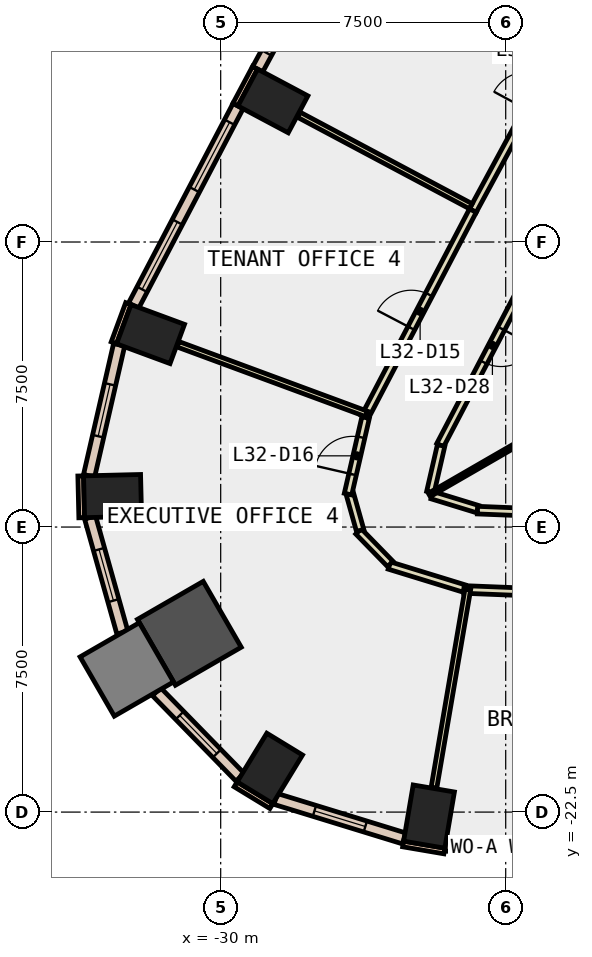
"""IFC4 building model, lengths in metres.
Left out: names, types, materials, properties, quantities, classifications, styles, units other than length and angle.
Written with IfcOpenShell. Run it as: python <this file> out.ifc"""

import sys

from ifc_helpers import new_model, si_unit, direction, frame, frame_2d, origin, origin_2d, place, context, subcontext, project, spatial, rectangle, extrude, element, fill, save


model = new_model("IFC4")
c1 = context("Model", 3, precision=1e-05, world=origin(), true_north=direction((0.0, 1.0)))
c2 = subcontext(c1, "Body", "Model", "MODEL_VIEW")
j1 = project(units=[si_unit("LENGTHUNIT", "METRE"), si_unit("PLANEANGLEUNIT", "RADIAN")], contexts=[c1])
p1 = place(None, origin())
s1 = spatial("IfcSite", under=j1, at=p1, CompositionType="ELEMENT")
p2 = place(p1, origin())
s2 = spatial("IfcBuilding", under=s1, at=p2, CompositionType="ELEMENT")
p3 = place(p2, frame((0.0, 0.0, 146.6)))
s3 = spatial("IfcBuildingStorey", under=s2, at=p3, CompositionType="ELEMENT", Elevation=146.6)
for number, where, z_axis, x_axis in (
    (1, (-24.518, -22.618, -0.4), (0.0, 0.0, 1.0), (-0.986, 0.168, 0.0)),
    (2, (-28.626, -3.788, -0.4), (0.0, 0.0, 1.0), (0.47, 0.883, 0.0)),
    (3, (-31.846, -9.923, -0.4), (0.0, 0.0, 1.0), (0.347, 0.938, 0.0)),
    (4, (-32.845, -14.185, -0.4), (0.0, 0.0, 1.0), (-0.024, 1.0, 0.0)),
):
    element("IfcColumn", number, at=place(p3, frame(where, z_axis=z_axis, x_axis=x_axis)), inside=s3, PredefinedType="COLUMN", context=c2, shape_type="SweptSolid", body=[
        extrude(rectangle(XDim=1.1, YDim=1.5, at=origin_2d()), origin(), (0.0, 0.0, 1.0), 4.2),
    ])
p4 = place(p3, frame((-30.825, -17.796, -0.4), z_axis=(0.0, 0.0, 1.0), x_axis=(0.866025403784, 0.5, 0.0)))
e5 = element("IfcColumn", 5, at=p4, inside=s3, PredefinedType="COLUMN", context=c2, shape_type="SweptSolid", body=[
    extrude(rectangle(XDim=2.0, YDim=2.0, at=origin_2d()), origin(), (0.0, 0.0, 1.0), 4.2),
])
p5 = place(p3, frame((-28.707, -21.352, -0.4), z_axis=(0.0, 0.0, 1.0), x_axis=(-0.853714435155, 0.520741455243, 0.0)))
e6 = element("IfcColumn", 6, at=p5, inside=s3, PredefinedType="COLUMN", context=c2, shape_type="SweptSolid", body=[
    extrude(rectangle(XDim=1.1, YDim=1.5, at=origin_2d()), origin(), (0.0, 0.0, 1.0), 4.2),
])
p6 = place(p3, frame((-32.47, -18.746, -0.4), z_axis=(0.0, 0.0, 1.0), x_axis=(0.866025403784, 0.5, 0.0)))
e7 = element("IfcColumn", 7, at=p6, inside=s3, PredefinedType="COLUMN", context=c2, shape_type="SweptSolid", body=[
    extrude(rectangle(XDim=1.8, YDim=1.8, at=origin_2d()), origin(), (0.0, 0.0, 1.0), 4.2),
])
for number, where, z_axis, x_axis in (
    (8, (-29.095, -2.915, 0.0), (0.0, 0.0, 1.0), (-0.47, -0.883, 0.0)),
    (9, (-32.429, -9.121, 0.0), (0.0, 0.0, 1.0), (-0.346, -0.938, 0.0)),
):
    element("IfcWall", number, at=place(p3, frame(where, z_axis=z_axis, x_axis=x_axis)), inside=s3, PredefinedType="STANDARD", context=c2, shape_type="SweptSolid", body=[
        extrude(rectangle(XDim=1.1, YDim=0.15, at=frame_2d((0.55, 0.0))), origin(), (0.0, 0.0, 1.0), 3.8),
    ])
p7 = place(p3, frame((-25.199, -23.339, 0.0), z_axis=(0.0, 0.0, 1.0), x_axis=(0.985800082077, -0.167923191299, 0.0)))
e10 = element("IfcWall", 10, at=p7, inside=s3, PredefinedType="STANDARD", context=c2, shape_type="SweptSolid", body=[
    extrude(rectangle(XDim=1.101, YDim=0.15, at=frame_2d((0.55, 0.0))), origin(), (0.0, 0.0, 1.0), 3.8),
])
p8 = place(p3, frame((-33.683, -13.655, 0.0), z_axis=(0.0, 0.0, 1.0), x_axis=(0.023744690764, -0.999718055084, 0.0)))
e11 = element("IfcWall", 11, at=p8, inside=s3, PredefinedType="STANDARD", context=c2, shape_type="SweptSolid", body=[
    extrude(rectangle(XDim=1.1, YDim=0.15, at=frame_2d((0.55, 0.0))), origin(), (0.0, 0.0, 1.0), 3.8),
])
p9 = place(p3, frame((-29.606, -21.77, 0.0), z_axis=(0.0, 0.0, 1.0), x_axis=(0.854005542721, -0.520263907071, 0.0)))
e12 = element("IfcWall", 12, at=p9, inside=s3, PredefinedType="STANDARD", context=c2, shape_type="SweptSolid", body=[
    extrude(rectangle(XDim=1.099, YDim=0.15, at=frame_2d((0.55, 0.0))), origin(), (0.0, 0.0, 1.0), 3.8),
])
p10 = place(p3, frame((-24.09, -23.378, 0.0), z_axis=(0.0, 0.0, 1.0), x_axis=(0.999203621229, -0.039901420066, 0.0)))
e13 = element("IfcWall", 13, at=p10, inside=s3, PredefinedType="STANDARD", context=c2, shape_type="SweptSolid", body=[
    extrude(rectangle(XDim=7.318, YDim=0.3, at=frame_2d((3.659, 0.0))), origin(), (0.0, 0.0, 1.0), 3.8),
])
p11 = place(p10, frame((0.629, 0.0, 0.9)))
e14 = element("IfcOpeningElement", 14, at=p11, cuts=e13, PredefinedType="OPENING", context=c2, shape_type="SweptSolid", body=[
    extrude(rectangle(XDim=2.4, YDim=2.6, at=frame_2d((1.2, 1.3))), frame((0.0, 0.16, 0.0), z_axis=(0.0, -1.0, 0.0), x_axis=(1.0, 0.0, 0.0)), (0.0, 0.0, 1.0), 0.32),
])
p12 = place(p10, frame((4.288, 0.0, 0.9)))
e15 = element("IfcOpeningElement", 15, at=p12, cuts=e13, PredefinedType="OPENING", context=c2, shape_type="SweptSolid", body=[
    extrude(rectangle(XDim=2.4, YDim=2.6, at=frame_2d((1.2, 1.3))), frame((0.0, 0.16, 0.0), z_axis=(0.0, -1.0, 0.0), x_axis=(1.0, 0.0, 0.0)), (0.0, 0.0, 1.0), 0.32),
])
p13 = place(p3, frame((-26.194, 2.282, 0.0), z_axis=(0.0, 0.0, 1.0), x_axis=(-0.475794135288, -0.87955667289, 0.0)))
e16 = element("IfcWall", 16, at=p13, inside=s3, PredefinedType="STANDARD", context=c2, shape_type="SweptSolid", body=[
    extrude(rectangle(XDim=5.952, YDim=0.3, at=frame_2d((2.976, 0.0))), origin(), (0.0, 0.0, 1.0), 3.8),
])
p14 = place(p13, frame((0.488, 0.0, 0.9)))
e17 = element("IfcOpeningElement", 17, at=p14, cuts=e16, PredefinedType="OPENING", context=c2, shape_type="SweptSolid", body=[
    extrude(rectangle(XDim=2.0, YDim=2.6, at=frame_2d((1.0, 1.3))), frame((0.0, 0.16, 0.0), z_axis=(0.0, -1.0, 0.0), x_axis=(1.0, 0.0, 0.0)), (0.0, 0.0, 1.0), 0.32),
])
p15 = place(p13, frame((3.464, 0.0, 0.9)))
e18 = element("IfcOpeningElement", 18, at=p15, cuts=e16, PredefinedType="OPENING", context=c2, shape_type="SweptSolid", body=[
    extrude(rectangle(XDim=2.0, YDim=2.6, at=frame_2d((1.0, 1.3))), frame((0.0, 0.16, 0.0), z_axis=(0.0, -1.0, 0.0), x_axis=(1.0, 0.0, 0.0)), (0.0, 0.0, 1.0), 0.32),
])
p16 = place(p3, frame((-29.542, -3.922, 0.0), z_axis=(0.0, 0.0, 1.0), x_axis=(-0.463809970306, -0.885934710599, 0.0)))
e19 = element("IfcWall", 19, at=p16, inside=s3, PredefinedType="STANDARD", context=c2, shape_type="SweptSolid", body=[
    extrude(rectangle(XDim=5.927, YDim=0.3, at=frame_2d((2.963, 0.0))), origin(), (0.0, 0.0, 1.0), 3.8),
])
p17 = place(p16, frame((0.482, 0.0, 0.9)))
e20 = element("IfcOpeningElement", 20, at=p17, cuts=e19, PredefinedType="OPENING", context=c2, shape_type="SweptSolid", body=[
    extrude(rectangle(XDim=2.0, YDim=2.6, at=frame_2d((1.0, 1.3))), frame((0.0, 0.16, 0.0), z_axis=(0.0, -1.0, 0.0), x_axis=(1.0, 0.0, 0.0)), (0.0, 0.0, 1.0), 0.32),
])
p18 = place(p16, frame((3.445, 0.0, 0.9)))
e21 = element("IfcOpeningElement", 21, at=p18, cuts=e19, PredefinedType="OPENING", context=c2, shape_type="SweptSolid", body=[
    extrude(rectangle(XDim=2.0, YDim=2.6, at=frame_2d((1.0, 1.3))), frame((0.0, 0.16, 0.0), z_axis=(0.0, -1.0, 0.0), x_axis=(1.0, 0.0, 0.0)), (0.0, 0.0, 1.0), 0.32),
])
p19 = place(p3, frame((-32.672, -10.203, 0.0), z_axis=(0.0, 0.0, 1.0), x_axis=(-0.223538714932, -0.974695051247, 0.0)))
e22 = element("IfcWall", 22, at=p19, inside=s3, PredefinedType="STANDARD", context=c2, shape_type="SweptSolid", body=[
    extrude(rectangle(XDim=3.538, YDim=0.3, at=frame_2d((1.769, 0.0))), origin(), (0.0, 0.0, 1.0), 3.8),
])
p20 = place(p19, frame((1.069, 0.0, 0.9)))
e23 = element("IfcOpeningElement", 23, at=p20, cuts=e22, PredefinedType="OPENING", context=c2, shape_type="SweptSolid", body=[
    extrude(rectangle(XDim=1.4, YDim=2.6, at=frame_2d((0.7, 1.3))), frame((0.0, 0.16, 0.0), z_axis=(0.0, -1.0, 0.0), x_axis=(1.0, 0.0, 0.0)), (0.0, 0.0, 1.0), 0.32),
])
p21 = place(p3, frame((-33.437, -14.749, 0.0), z_axis=(0.0, 0.0, 1.0), x_axis=(0.270471130801, -0.962728085912, 0.0)))
e24 = element("IfcWall", 24, at=p21, inside=s3, PredefinedType="STANDARD", context=c2, shape_type="SweptSolid", body=[
    extrude(rectangle(XDim=3.143, YDim=0.3, at=frame_2d((1.572, 0.0))), origin(), (0.0, 0.0, 1.0), 3.8),
])
p22 = place(p21, frame((0.872, 0.0, 0.9)))
e25 = element("IfcOpeningElement", 25, at=p22, cuts=e24, PredefinedType="OPENING", context=c2, shape_type="SweptSolid", body=[
    extrude(rectangle(XDim=1.4, YDim=2.6, at=frame_2d((0.7, 1.3))), frame((0.0, 0.16, 0.0), z_axis=(0.0, -1.0, 0.0), x_axis=(1.0, 0.0, 0.0)), (0.0, 0.0, 1.0), 0.32),
])
p23 = place(p3, frame((-31.688, -19.332, 0.0), z_axis=(0.0, 0.0, 1.0), x_axis=(0.698633260198, -0.715479956215, 0.0)))
e26 = element("IfcWall", 26, at=p23, inside=s3, PredefinedType="STANDARD", context=c2, shape_type="SweptSolid", body=[
    extrude(rectangle(XDim=3.145, YDim=0.3, at=frame_2d((1.572, 0.0))), origin(), (0.0, 0.0, 1.0), 3.8),
])
p24 = place(p23, frame((0.872, 0.0, 0.9)))
e27 = element("IfcOpeningElement", 27, at=p24, cuts=e26, PredefinedType="OPENING", context=c2, shape_type="SweptSolid", body=[
    extrude(rectangle(XDim=1.4, YDim=2.6, at=frame_2d((0.7, 1.3))), frame((0.0, 0.16, 0.0), z_axis=(0.0, -1.0, 0.0), x_axis=(1.0, 0.0, 0.0)), (0.0, 0.0, 1.0), 0.32),
])
p25 = place(p3, frame((-28.554, -22.154, 0.0), z_axis=(0.0, 0.0, 1.0), x_axis=(0.955874475611, -0.293775402094, 0.0)))
e28 = element("IfcWall", 28, at=p25, inside=s3, PredefinedType="STANDARD", context=c2, shape_type="SweptSolid", body=[
    extrude(rectangle(XDim=3.537, YDim=0.3, at=frame_2d((1.769, 0.0))), origin(), (0.0, 0.0, 1.0), 3.8),
])
p26 = place(p25, frame((1.069, 0.0, 0.9)))
e29 = element("IfcOpeningElement", 29, at=p26, cuts=e28, PredefinedType="OPENING", context=c2, shape_type="SweptSolid", body=[
    extrude(rectangle(XDim=1.4, YDim=2.6, at=frame_2d((0.7, 1.3))), frame((0.0, 0.16, 0.0), z_axis=(0.0, -1.0, 0.0), x_axis=(1.0, 0.0, 0.0)), (0.0, 0.0, 1.0), 0.32),
])
p27 = place(p3, frame((-21.475, -7.594, 0.0), z_axis=(0.0, 0.0, 1.0), x_axis=(-0.463809970306, -0.885934710599, 0.0)))
e30 = element("IfcWall", 30, at=p27, inside=s3, PredefinedType="PARTITIONING", context=c2, shape_type="SweptSolid", body=[
    extrude(rectangle(XDim=5.927, YDim=0.2, at=frame_2d((2.963, 0.0))), origin(), (0.0, 0.0, 1.0), 3.8),
])
p28 = place(p27, frame((2.464, 0.0, 0.0)))
e31 = element("IfcOpeningElement", 31, at=p28, cuts=e30, PredefinedType="OPENING", context=c2, shape_type="SweptSolid", body=[
    extrude(rectangle(XDim=1.0, YDim=2.1, at=frame_2d((0.5, 1.05))), frame((0.0, 0.11, 0.0), z_axis=(0.0, -1.0, 0.0), x_axis=(1.0, 0.0, 0.0)), (0.0, 0.0, 1.0), 0.22),
])
p29 = place(p3, frame((-24.2, -12.854, 0.0), z_axis=(0.0, 0.0, 1.0), x_axis=(-0.223967203961, -0.974596681479, 0.0)))
e32 = element("IfcWall", 32, at=p29, inside=s3, PredefinedType="PARTITIONING", context=c2, shape_type="SweptSolid", body=[
    extrude(rectangle(XDim=1.259, YDim=0.2, at=frame_2d((0.629, 0.0))), origin(), (0.0, 0.0, 1.0), 3.8),
])
p30 = place(p3, frame((-24.435, -14.162, 0.0), z_axis=(0.0, 0.0, 1.0), x_axis=(0.956086269468, -0.293085389152, 0.0)))
e33 = element("IfcWall", 33, at=p30, inside=s3, PredefinedType="PARTITIONING", context=c2, shape_type="SweptSolid", body=[
    extrude(rectangle(XDim=1.252, YDim=0.2, at=frame_2d((0.626, 0.0))), origin(), (0.0, 0.0, 1.0), 3.8),
])
p31 = place(p3, frame((-23.242, -14.555, 0.0), z_axis=(0.0, 0.0, 1.0), x_axis=(0.999202143743, -0.039938401802, 0.0)))
e34 = element("IfcWall", 34, at=p31, inside=s3, PredefinedType="PARTITIONING", context=c2, shape_type="SweptSolid", body=[
    extrude(rectangle(XDim=7.238, YDim=0.2, at=frame_2d((3.619, 0.0))), origin(), (0.0, 0.0, 1.0), 3.8),
])
p32 = place(p31, frame((3.119, 0.0, 0.0)))
e35 = element("IfcOpeningElement", 35, at=p32, cuts=e34, PredefinedType="OPENING", context=c2, shape_type="SweptSolid", body=[
    extrude(rectangle(XDim=1.0, YDim=2.1, at=frame_2d((0.5, 1.05))), frame((0.0, 0.11, 0.0), z_axis=(0.0, -1.0, 0.0), x_axis=(1.0, 0.0, 0.0)), (0.0, 0.0, 1.0), 0.22),
])
p33 = place(p3, frame((-23.365, -6.673, 0.0), z_axis=(0.0, 0.0, 1.0), x_axis=(0.47597665142, 0.879457916732, 0.0)))
e36 = element("IfcWall", 36, at=p33, inside=s3, PredefinedType="PARTITIONING", context=c2, shape_type="SweptSolid", body=[
    extrude(rectangle(XDim=7.032, YDim=0.2, at=frame_2d((3.516, 0.0))), origin(), (0.0, 0.0, 1.0), 3.8),
])
p34 = place(p33, frame((3.016, 0.0, 0.0)))
e37 = element("IfcOpeningElement", 37, at=p34, cuts=e36, PredefinedType="OPENING", context=c2, shape_type="SweptSolid", body=[
    extrude(rectangle(XDim=1.0, YDim=2.1, at=frame_2d((0.5, 1.05))), frame((0.0, 0.11, 0.0), z_axis=(0.0, -1.0, 0.0), x_axis=(1.0, 0.0, 0.0)), (0.0, 0.0, 1.0), 0.22),
])
p35 = place(p3, frame((-26.21, -12.111, 0.0), z_axis=(0.0, 0.0, 1.0), x_axis=(0.46374980173, 0.885966207818, 0.0)))
e38 = element("IfcWall", 38, at=p35, inside=s3, PredefinedType="PARTITIONING", context=c2, shape_type="SweptSolid", body=[
    extrude(rectangle(XDim=6.137, YDim=0.2, at=frame_2d((3.068, 0.0))), origin(), (0.0, 0.0, 1.0), 3.8),
])
p36 = place(p35, frame((2.644, 0.0, 0.0)))
e39 = element("IfcOpeningElement", 39, at=p36, cuts=e38, PredefinedType="OPENING", context=c2, shape_type="SweptSolid", body=[
    extrude(rectangle(XDim=1.0, YDim=2.1, at=frame_2d((0.5, 1.05))), frame((0.0, 0.11, 0.0), z_axis=(0.0, -1.0, 0.0), x_axis=(1.0, 0.0, 0.0)), (0.0, 0.0, 1.0), 0.22),
])
p37 = place(p3, frame((-23.594, -16.617, 0.0), z_axis=(0.0, 0.0, 1.0), x_axis=(-0.955896815358, 0.293702704087, 0.0)))
e40 = element("IfcWall", 40, at=p37, inside=s3, PredefinedType="PARTITIONING", context=c2, shape_type="SweptSolid", body=[
    extrude(rectangle(XDim=2.06, YDim=0.2, at=frame_2d((1.03, 0.0))), origin(), (0.0, 0.0, 1.0), 3.8),
])
p38 = place(p3, frame((-25.538, -15.97, 0.0), z_axis=(0.0, 0.0, 1.0), x_axis=(-0.698272822523, 0.715831729756, 0.0)))
e41 = element("IfcWall", 41, at=p38, inside=s3, PredefinedType="PARTITIONING", context=c2, shape_type="SweptSolid", body=[
    extrude(rectangle(XDim=1.196, YDim=0.2, at=frame_2d((0.598, 0.0))), origin(), (0.0, 0.0, 1.0), 3.8),
])
p39 = place(p3, frame((-26.33, -15.089, 0.0), z_axis=(0.0, 0.0, 1.0), x_axis=(-0.270631784819, 0.962682936925, 0.0)))
e42 = element("IfcWall", 42, at=p39, inside=s3, PredefinedType="PARTITIONING", context=c2, shape_type="SweptSolid", body=[
    extrude(rectangle(XDim=0.994, YDim=0.2, at=frame_2d((0.497, 0.0))), origin(), (0.0, 0.0, 1.0), 3.8),
])
p40 = place(p3, frame((-26.649, -14.133, 0.0), z_axis=(0.0, 0.0, 1.0), x_axis=(0.224108401048, 0.974564222912, 0.0)))
e43 = element("IfcWall", 43, at=p40, inside=s3, PredefinedType="PARTITIONING", context=c2, shape_type="SweptSolid", body=[
    extrude(rectangle(XDim=2.065, YDim=0.2, at=frame_2d((1.033, 0.0))), origin(), (0.0, 0.0, 1.0), 3.8),
])
p41 = place(p40, frame((0.533, 0.0, 0.0)))
e44 = element("IfcOpeningElement", 44, at=p41, cuts=e43, PredefinedType="OPENING", context=c2, shape_type="SweptSolid", body=[
    extrude(rectangle(XDim=1.0, YDim=2.1, at=frame_2d((0.5, 1.05))), frame((0.0, 0.11, 0.0), z_axis=(0.0, -1.0, 0.0), x_axis=(1.0, 0.0, 0.0)), (0.0, 0.0, 1.0), 0.22),
])
p42 = place(p3, frame((-15.94, -16.948, 0.0), z_axis=(0.0, 0.0, 1.0), x_axis=(-0.999203094545, 0.03991460699, 0.0)))
e45 = element("IfcWall", 45, at=p42, inside=s3, PredefinedType="PARTITIONING", context=c2, shape_type="SweptSolid", body=[
    extrude(rectangle(XDim=7.664, YDim=0.2, at=frame_2d((3.832, 0.0))), origin(), (0.0, 0.0, 1.0), 3.8),
])
p43 = place(p42, frame((3.332, 0.0, 0.0)))
e46 = element("IfcOpeningElement", 46, at=p43, cuts=e45, PredefinedType="OPENING", context=c2, shape_type="SweptSolid", body=[
    extrude(rectangle(XDim=1.0, YDim=2.1, at=frame_2d((0.5, 1.05))), frame((0.0, 0.11, 0.0), z_axis=(0.0, -1.0, 0.0), x_axis=(1.0, 0.0, 0.0)), (0.0, 0.0, 1.0), 0.22),
])
p44 = place(p3, frame((-18.553, -10.715, 0.0), z_axis=(0.0, 0.0, 1.0), x_axis=(-0.865984622623, -0.500070628392, 0.0)))
e47 = element("IfcWall", 47, at=p44, inside=s3, PredefinedType="PARTITIONING", context=c2, shape_type="SweptSolid", body=[
    extrude(rectangle(XDim=6.879, YDim=0.1, at=frame_2d((3.439, 0.0))), origin(), (0.0, 0.0, 1.0), 3.8),
])
p45 = place(p3, frame((-23.417, -6.56, 0.0), z_axis=(0.0, 0.0, 1.0), x_axis=(-0.882784638588, 0.469777906967, 0.0)))
e48 = element("IfcWall", 48, at=p45, inside=s3, PredefinedType="PARTITIONING", context=c2, shape_type="SweptSolid", body=[
    extrude(rectangle(XDim=5.13, YDim=0.15, at=frame_2d((2.565, 0.0))), origin(), (0.0, 0.0, 1.0), 3.8),
])
p46 = place(p3, frame((-26.164, -12.023, 0.0), z_axis=(0.0, 0.0, 1.0), x_axis=(-0.937995804261, 0.346646608505, 0.0)))
e49 = element("IfcWall", 49, at=p46, inside=s3, PredefinedType="PARTITIONING", context=c2, shape_type="SweptSolid", body=[
    extrude(rectangle(XDim=5.288, YDim=0.15, at=frame_2d((2.644, 0.0))), origin(), (0.0, 0.0, 1.0), 3.8),
])
p47 = place(p3, frame((-23.498, -16.646, 0.0), z_axis=(0.0, 0.0, 1.0), x_axis=(-0.168275674737, -0.985739974482, 0.0)))
e50 = element("IfcWall", 50, at=p47, inside=s3, PredefinedType="PARTITIONING", context=c2, shape_type="SweptSolid", body=[
    extrude(rectangle(XDim=5.288, YDim=0.15, at=frame_2d((2.644, 0.0))), origin(), (0.0, 0.0, 1.0), 3.8),
])
p48 = place(p11, origin())
e51 = element("IfcWindow", 51, at=p48, inside=s3, PartitioningType="SINGLE_PANEL", PredefinedType="WINDOW", context=c2, shape_type="SweptSolid", body=[
    extrude(rectangle(XDim=2.4, YDim=2.6, at=frame_2d((1.2, 1.3))), frame((0.0, 0.03, 0.0), z_axis=(0.0, -1.0, 0.0), x_axis=(1.0, 0.0, 0.0)), (0.0, 0.0, 1.0), 0.06),
])
fill(e14, e51)
p49 = place(p15, origin())
e52 = element("IfcWindow", 52, at=p49, inside=s3, PartitioningType="SINGLE_PANEL", PredefinedType="WINDOW", context=c2, shape_type="SweptSolid", body=[
    extrude(rectangle(XDim=2.0, YDim=2.6, at=frame_2d((1.0, 1.3))), frame((0.0, 0.03, 0.0), z_axis=(0.0, -1.0, 0.0), x_axis=(1.0, 0.0, 0.0)), (0.0, 0.0, 1.0), 0.06),
])
fill(e18, e52)
p50 = place(p17, origin())
e53 = element("IfcWindow", 53, at=p50, inside=s3, PartitioningType="SINGLE_PANEL", PredefinedType="WINDOW", context=c2, shape_type="SweptSolid", body=[
    extrude(rectangle(XDim=2.0, YDim=2.6, at=frame_2d((1.0, 1.3))), frame((0.0, 0.03, 0.0), z_axis=(0.0, -1.0, 0.0), x_axis=(1.0, 0.0, 0.0)), (0.0, 0.0, 1.0), 0.06),
])
fill(e20, e53)
p51 = place(p18, origin())
e54 = element("IfcWindow", 54, at=p51, inside=s3, PartitioningType="SINGLE_PANEL", PredefinedType="WINDOW", context=c2, shape_type="SweptSolid", body=[
    extrude(rectangle(XDim=2.0, YDim=2.6, at=frame_2d((1.0, 1.3))), frame((0.0, 0.03, 0.0), z_axis=(0.0, -1.0, 0.0), x_axis=(1.0, 0.0, 0.0)), (0.0, 0.0, 1.0), 0.06),
])
fill(e21, e54)
p52 = place(p20, origin())
e55 = element("IfcWindow", 55, at=p52, inside=s3, PartitioningType="SINGLE_PANEL", PredefinedType="WINDOW", context=c2, shape_type="SweptSolid", body=[
    extrude(rectangle(XDim=1.4, YDim=2.6, at=frame_2d((0.7, 1.3))), frame((0.0, 0.03, 0.0), z_axis=(0.0, -1.0, 0.0), x_axis=(1.0, 0.0, 0.0)), (0.0, 0.0, 1.0), 0.06),
])
fill(e23, e55)
p53 = place(p22, origin())
e56 = element("IfcWindow", 56, at=p53, inside=s3, PartitioningType="SINGLE_PANEL", PredefinedType="WINDOW", context=c2, shape_type="SweptSolid", body=[
    extrude(rectangle(XDim=1.4, YDim=2.6, at=frame_2d((0.7, 1.3))), frame((0.0, 0.03, 0.0), z_axis=(0.0, -1.0, 0.0), x_axis=(1.0, 0.0, 0.0)), (0.0, 0.0, 1.0), 0.06),
])
fill(e25, e56)
p54 = place(p24, origin())
e57 = element("IfcWindow", 57, at=p54, inside=s3, PartitioningType="SINGLE_PANEL", PredefinedType="WINDOW", context=c2, shape_type="SweptSolid", body=[
    extrude(rectangle(XDim=1.4, YDim=2.6, at=frame_2d((0.7, 1.3))), frame((0.0, 0.03, 0.0), z_axis=(0.0, -1.0, 0.0), x_axis=(1.0, 0.0, 0.0)), (0.0, 0.0, 1.0), 0.06),
])
fill(e27, e57)
p55 = place(p26, origin())
e58 = element("IfcWindow", 58, at=p55, inside=s3, PartitioningType="SINGLE_PANEL", PredefinedType="WINDOW", context=c2, shape_type="SweptSolid", body=[
    extrude(rectangle(XDim=1.4, YDim=2.6, at=frame_2d((0.7, 1.3))), frame((0.0, 0.03, 0.0), z_axis=(0.0, -1.0, 0.0), x_axis=(1.0, 0.0, 0.0)), (0.0, 0.0, 1.0), 0.06),
])
fill(e29, e58)
p56 = place(p36, origin())
e59 = element("IfcDoor", 59, at=p56, inside=s3, OperationType="SINGLE_SWING_LEFT", PredefinedType="DOOR", context=c2, shape_type="SweptSolid", body=[
    extrude(rectangle(XDim=1.0, YDim=2.1, at=frame_2d((0.5, 1.05))), frame((0.0, 0.025, 0.0), z_axis=(0.0, -1.0, 0.0), x_axis=(1.0, 0.0, 0.0)), (0.0, 0.0, 1.0), 0.05),
])
fill(e39, e59)
p57 = place(p41, origin())
e60 = element("IfcDoor", 60, at=p57, inside=s3, OperationType="SINGLE_SWING_LEFT", PredefinedType="DOOR", context=c2, shape_type="SweptSolid", body=[
    extrude(rectangle(XDim=1.0, YDim=2.1, at=frame_2d((0.5, 1.05))), frame((0.0, 0.025, 0.0), z_axis=(0.0, -1.0, 0.0), x_axis=(1.0, 0.0, 0.0)), (0.0, 0.0, 1.0), 0.05),
])
fill(e44, e60)
p58 = place(p28, origin())
e61 = element("IfcDoor", 61, at=p58, inside=s3, OperationType="SINGLE_SWING_LEFT", PredefinedType="DOOR", context=c2, shape_type="SweptSolid", body=[
    extrude(rectangle(XDim=1.0, YDim=2.1, at=frame_2d((0.5, 1.05))), frame((0.0, 0.025, 0.0), z_axis=(0.0, -1.0, 0.0), x_axis=(1.0, 0.0, 0.0)), (0.0, 0.0, 1.0), 0.05),
])
fill(e31, e61)
save(model, sys.argv[1])
